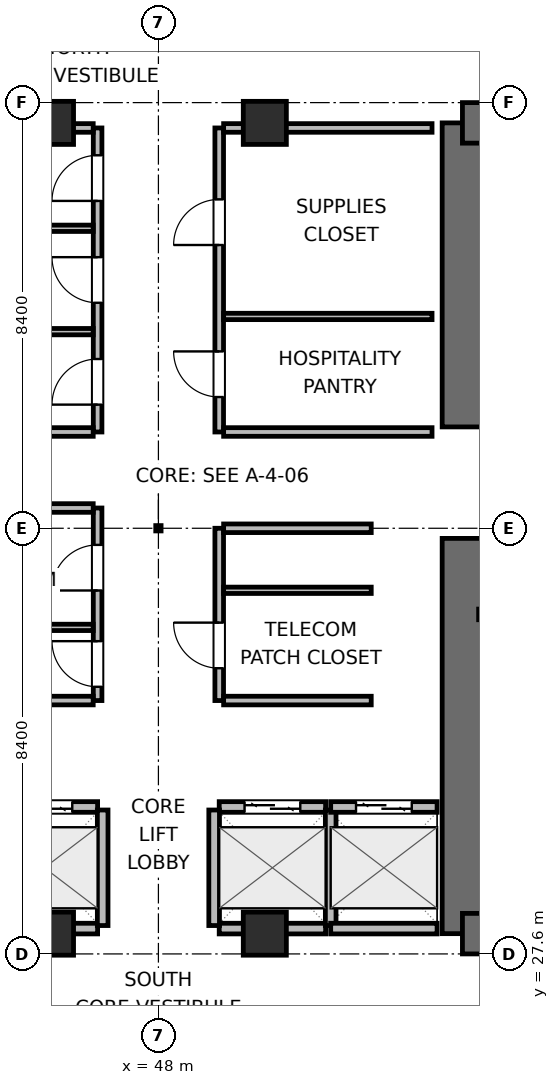
"""IFC4 building model, lengths in metres.
Left out: names, types, materials, properties, quantities, classifications, styles, units other than length and angle.
Written with IfcOpenShell. Run it as: python <this file> out.ifc"""

import sys

from ifc_helpers import new_model, si_unit, direction, frame, frame_2d, origin, origin_2d, place, context, subcontext, project, spatial, rectangle, extrude, element, fill, save


model = new_model("IFC4")
c1 = context("Model", 3, precision=1e-05, world=origin(), true_north=direction((0.0, 1.0)))
c2 = subcontext(c1, "Body", "Model", "MODEL_VIEW")
j1 = project(units=[si_unit("LENGTHUNIT", "METRE"), si_unit("PLANEANGLEUNIT", "RADIAN")], contexts=[c1])
p1 = place(None, origin())
s1 = spatial("IfcSite", under=j1, at=p1, CompositionType="ELEMENT")
p2 = place(p1, origin())
s2 = spatial("IfcBuilding", under=s1, at=p2, CompositionType="ELEMENT")
p3 = place(p2, frame((0.0, 0.0, 97.5)))
s3 = spatial("IfcBuildingStorey", under=s2, at=p3, CompositionType="ELEMENT", Elevation=97.5)
p4 = place(p3, frame((54.0, 28.0, 0.0), z_axis=(0.0, 0.0, 1.0), x_axis=(0.0, 1.0, 0.0)))
e1 = element("IfcWall", 1, at=p4, inside=s3, PredefinedType="SHEAR", context=c2, shape_type="SweptSolid", body=[
    extrude(rectangle(XDim=7.8, YDim=0.8, at=frame_2d((3.9, 0.0))), origin(), (0.0, 0.0, 1.0), 3.9),
])
p5 = place(p3, frame((54.0, 38.0, 0.0), z_axis=(0.0, 0.0, 1.0), x_axis=(0.0, 1.0, 0.0)))
e2 = element("IfcWall", 2, at=p5, inside=s3, PredefinedType="SHEAR", context=c2, shape_type="SweptSolid", body=[
    extrude(rectangle(XDim=6.0, YDim=0.8, at=frame_2d((3.0, 0.0))), origin(), (0.0, 0.0, 1.0), 3.9),
])
p6 = place(p3, frame((54.0, 28.0, 0.0), z_axis=(0.0, 0.0, 1.0), x_axis=(1.0, 0.0, 0.0)))
e3 = element("IfcWall", 3, at=p6, inside=s3, PredefinedType="SHEAR", context=c2, shape_type="SweptSolid", body=[
    extrude(rectangle(XDim=9.2, YDim=0.8, at=frame_2d((4.6, 0.0))), origin(), (0.0, 0.0, 1.0), 3.9),
])
p7 = place(p6, frame((3.925, 0.0, 0.0)))
e4 = element("IfcOpeningElement", 4, at=p7, cuts=e3, PredefinedType="OPENING", context=c2, shape_type="SweptSolid", body=[
    extrude(rectangle(XDim=1.05, YDim=2.04, at=frame_2d((0.525, 1.02))), frame((0.0, 0.41, 0.0), z_axis=(0.0, -1.0, 0.0), x_axis=(1.0, 0.0, 0.0)), (0.0, 0.0, 1.0), 0.82),
])
p8 = place(p3, frame((54.0, 44.0, 0.0), z_axis=(0.0, 0.0, 1.0), x_axis=(1.0, 0.0, 0.0)))
e5 = element("IfcWall", 5, at=p8, inside=s3, PredefinedType="SHEAR", context=c2, shape_type="SweptSolid", body=[
    extrude(rectangle(XDim=9.2, YDim=0.8, at=frame_2d((4.6, 0.0))), origin(), (0.0, 0.0, 1.0), 3.9),
])
for number, where, z_axis, x_axis in (
    (6, (45.9, 28.0, 0.0), (0.0, 0.0, 1.0), (1.0, 0.0, 0.0)),
    (7, (50.1, 28.0, 0.0), (0.0, 0.0, 1.0), (1.0, 0.0, 0.0)),
    (8, (45.9, 44.0, 0.0), (0.0, 0.0, 1.0), (1.0, 0.0, 0.0)),
    (9, (50.1, 44.0, 0.0), (0.0, 0.0, 1.0), (1.0, 0.0, 0.0)),
):
    element("IfcColumn", number, at=place(p3, frame(where, z_axis=z_axis, x_axis=x_axis)), inside=s3, PredefinedType="COLUMN", context=c2, shape_type="SweptSolid", body=[
        extrude(rectangle(XDim=0.85, YDim=0.85, at=origin_2d()), origin(), (0.0, 0.0, 1.0), 3.9),
    ])
p9 = place(p3, frame((44.7, 30.5, 0.0), z_axis=(0.0, 0.0, 1.0), x_axis=(1.0, 0.0, 0.0)))
e10 = element("IfcWall", 10, at=p9, inside=s3, PredefinedType="PARTITIONING", context=c2, shape_type="SweptSolid", body=[
    extrude(rectangle(XDim=2.1, YDim=0.21, at=frame_2d((1.05, 0.0))), origin(), (0.0, 0.0, 1.0), 3.64),
])
p10 = place(p9, frame((0.5, 0.0, 0.0)))
e11 = element("IfcOpeningElement", 11, at=p10, cuts=e10, PredefinedType="OPENING", context=c2, shape_type="SweptSolid", body=[
    extrude(rectangle(XDim=1.1, YDim=2.04, at=frame_2d((0.55, 1.02))), frame((0.0, 0.115, 0.0), z_axis=(0.0, -1.0, 0.0), x_axis=(1.0, 0.0, 0.0)), (0.0, 0.0, 1.0), 0.23),
])
p11 = place(p3, frame((44.7, 28.1, 0.0), z_axis=(0.0, 0.0, 1.0), x_axis=(1.0, 0.0, 0.0)))
e12 = element("IfcWall", 12, at=p11, inside=s3, PredefinedType="PARTITIONING", context=c2, shape_type="SweptSolid", body=[
    extrude(rectangle(XDim=2.1, YDim=0.21, at=frame_2d((1.05, 0.0))), origin(), (0.0, 0.0, 1.0), 2.525),
])
p12 = place(p3, frame((46.9, 28.16, 0.0), z_axis=(0.0, 0.0, 1.0), x_axis=(0.0, 1.0, 0.0)))
e13 = element("IfcWall", 13, at=p12, inside=s3, PredefinedType="PARTITIONING", context=c2, shape_type="SweptSolid", body=[
    extrude(rectangle(XDim=2.28, YDim=0.21, at=frame_2d((1.14, 0.0))), origin(), (0.0, 0.0, 1.0), 3.64),
])
p13 = place(p3, frame((49.2, 30.5, 0.0), z_axis=(0.0, 0.0, 1.0), x_axis=(1.0, 0.0, 0.0)))
e14 = element("IfcWall", 14, at=p13, inside=s3, PredefinedType="PARTITIONING", context=c2, shape_type="SweptSolid", body=[
    extrude(rectangle(XDim=2.1, YDim=0.21, at=frame_2d((1.05, 0.0))), origin(), (0.0, 0.0, 1.0), 3.64),
])
p14 = place(p13, frame((0.5, 0.0, 0.0)))
e15 = element("IfcOpeningElement", 15, at=p14, cuts=e14, PredefinedType="OPENING", context=c2, shape_type="SweptSolid", body=[
    extrude(rectangle(XDim=1.1, YDim=2.04, at=frame_2d((0.55, 1.02))), frame((0.0, 0.115, 0.0), z_axis=(0.0, -1.0, 0.0), x_axis=(1.0, 0.0, 0.0)), (0.0, 0.0, 1.0), 0.23),
])
p15 = place(p3, frame((49.2, 28.1, 0.0), z_axis=(0.0, 0.0, 1.0), x_axis=(1.0, 0.0, 0.0)))
e16 = element("IfcWall", 16, at=p15, inside=s3, PredefinedType="PARTITIONING", context=c2, shape_type="SweptSolid", body=[
    extrude(rectangle(XDim=2.1, YDim=0.21, at=frame_2d((1.05, 0.0))), origin(), (0.0, 0.0, 1.0), 2.525),
])
for number, where, z_axis, x_axis in (
    (17, (49.1, 28.16, 0.0), (0.0, 0.0, 1.0), (0.0, 1.0, 0.0)),
    (18, (51.4, 28.16, 0.0), (0.0, 0.0, 1.0), (0.0, 1.0, 0.0)),
):
    element("IfcWall", number, at=place(p3, frame(where, z_axis=z_axis, x_axis=x_axis)), inside=s3, PredefinedType="PARTITIONING", context=c2, shape_type="SweptSolid", body=[
        extrude(rectangle(XDim=2.28, YDim=0.21, at=frame_2d((1.14, 0.0))), origin(), (0.0, 0.0, 1.0), 3.64),
    ])
p16 = place(p3, frame((51.4, 30.5, 0.0), z_axis=(0.0, 0.0, 1.0), x_axis=(1.0, 0.0, 0.0)))
e19 = element("IfcWall", 19, at=p16, inside=s3, PredefinedType="PARTITIONING", context=c2, shape_type="SweptSolid", body=[
    extrude(rectangle(XDim=2.1, YDim=0.21, at=frame_2d((1.05, 0.0))), origin(), (0.0, 0.0, 1.0), 3.64),
])
p17 = place(p16, frame((0.5, 0.0, 0.0)))
e20 = element("IfcOpeningElement", 20, at=p17, cuts=e19, PredefinedType="OPENING", context=c2, shape_type="SweptSolid", body=[
    extrude(rectangle(XDim=1.1, YDim=2.04, at=frame_2d((0.55, 1.02))), frame((0.0, 0.115, 0.0), z_axis=(0.0, -1.0, 0.0), x_axis=(1.0, 0.0, 0.0)), (0.0, 0.0, 1.0), 0.23),
])
p18 = place(p3, frame((51.4, 28.1, 0.0), z_axis=(0.0, 0.0, 1.0), x_axis=(1.0, 0.0, 0.0)))
e21 = element("IfcWall", 21, at=p18, inside=s3, PredefinedType="PARTITIONING", context=c2, shape_type="SweptSolid", body=[
    extrude(rectangle(XDim=2.1, YDim=0.21, at=frame_2d((1.05, 0.0))), origin(), (0.0, 0.0, 1.0), 2.525),
])
p19 = place(p3, frame((46.8, 32.6, 0.0), z_axis=(0.0, 0.0, 1.0), x_axis=(0.0, 1.0, 0.0)))
e22 = element("IfcWall", 22, at=p19, inside=s3, PredefinedType="PARTITIONING", context=c2, shape_type="SweptSolid", body=[
    extrude(rectangle(XDim=3.8, YDim=0.17, at=frame_2d((1.9, 0.0))), origin(), (0.0, 0.0, 1.0), 3.64),
])
p20 = place(p19, frame((0.272, 0.0, 0.0)))
e23 = element("IfcOpeningElement", 23, at=p20, cuts=e22, PredefinedType="OPENING", context=c2, shape_type="SweptSolid", body=[
    extrude(rectangle(XDim=0.9, YDim=2.02, at=frame_2d((0.45, 1.01))), frame((0.0, 0.095, 0.0), z_axis=(0.0, -1.0, 0.0), x_axis=(1.0, 0.0, 0.0)), (0.0, 0.0, 1.0), 0.19),
])
p21 = place(p19, frame((2.172, 0.0, 0.0)))
e24 = element("IfcOpeningElement", 24, at=p21, cuts=e22, PredefinedType="OPENING", context=c2, shape_type="SweptSolid", body=[
    extrude(rectangle(XDim=0.9, YDim=2.02, at=frame_2d((0.45, 1.01))), frame((0.0, 0.095, 0.0), z_axis=(0.0, -1.0, 0.0), x_axis=(1.0, 0.0, 0.0)), (0.0, 0.0, 1.0), 0.19),
])
for number, where, z_axis, x_axis in (
    (25, (43.8, 32.6, 0.0), (0.0, 0.0, 1.0), (1.0, 0.0, 0.0)),
    (26, (43.8, 36.4, 0.0), (0.0, 0.0, 1.0), (1.0, 0.0, 0.0)),
):
    element("IfcWall", number, at=place(p3, frame(where, z_axis=z_axis, x_axis=x_axis)), inside=s3, PredefinedType="PARTITIONING", context=c2, shape_type="SweptSolid", body=[
        extrude(rectangle(XDim=2.913, YDim=0.17, at=frame_2d((1.457, 0.0))), origin(), (0.0, 0.0, 1.0), 3.64),
    ])
p22 = place(p3, frame((43.8, 34.044, 0.0), z_axis=(0.0, 0.0, 1.0), x_axis=(1.0, 0.0, 0.0)))
e27 = element("IfcWall", 27, at=p22, inside=s3, PredefinedType="PARTITIONING", context=c2, shape_type="SweptSolid", body=[
    extrude(rectangle(XDim=2.913, YDim=0.125, at=frame_2d((1.457, 0.0))), origin(), (0.0, 0.0, 1.0), 3.64),
])
p23 = place(p3, frame((49.2, 32.6, 0.0), z_axis=(0.0, 0.0, 1.0), x_axis=(0.0, 1.0, 0.0)))
e28 = element("IfcWall", 28, at=p23, inside=s3, PredefinedType="PARTITIONING", context=c2, shape_type="SweptSolid", body=[
    extrude(rectangle(XDim=3.4, YDim=0.17, at=frame_2d((1.7, 0.0))), origin(), (0.0, 0.0, 1.0), 3.64),
])
p24 = place(p23, frame((0.638, 0.0, 0.0)))
e29 = element("IfcOpeningElement", 29, at=p24, cuts=e28, PredefinedType="OPENING", context=c2, shape_type="SweptSolid", body=[
    extrude(rectangle(XDim=0.9, YDim=2.02, at=frame_2d((0.45, 1.01))), frame((0.0, 0.095, 0.0), z_axis=(0.0, -1.0, 0.0), x_axis=(1.0, 0.0, 0.0)), (0.0, 0.0, 1.0), 0.19),
])
for number, where, z_axis, x_axis in (
    (30, (49.287, 32.6, 0.0), (0.0, 0.0, 1.0), (1.0, 0.0, 0.0)),
    (31, (49.287, 36.0, 0.0), (0.0, 0.0, 1.0), (1.0, 0.0, 0.0)),
):
    element("IfcWall", number, at=place(p3, frame(where, z_axis=z_axis, x_axis=x_axis)), inside=s3, PredefinedType="PARTITIONING", context=c2, shape_type="SweptSolid", body=[
        extrude(rectangle(XDim=2.913, YDim=0.17, at=frame_2d((1.457, 0.0))), origin(), (0.0, 0.0, 1.0), 3.64),
    ])
p25 = place(p3, frame((49.287, 34.776, 0.0), z_axis=(0.0, 0.0, 1.0), x_axis=(1.0, 0.0, 0.0)))
e32 = element("IfcWall", 32, at=p25, inside=s3, PredefinedType="PARTITIONING", context=c2, shape_type="SweptSolid", body=[
    extrude(rectangle(XDim=2.913, YDim=0.125, at=frame_2d((1.457, 0.0))), origin(), (0.0, 0.0, 1.0), 3.64),
])
p26 = place(p3, frame((46.8, 37.9, 0.0), z_axis=(0.0, 0.0, 1.0), x_axis=(0.0, 1.0, 0.0)))
e33 = element("IfcWall", 33, at=p26, inside=s3, PredefinedType="PARTITIONING", context=c2, shape_type="SweptSolid", body=[
    extrude(rectangle(XDim=6.0, YDim=0.17, at=frame_2d((3.0, 0.0))), origin(), (0.0, 0.0, 1.0), 3.64),
])
p27 = place(p26, frame((0.54, 0.0, 0.0)))
e34 = element("IfcOpeningElement", 34, at=p27, cuts=e33, PredefinedType="OPENING", context=c2, shape_type="SweptSolid", body=[
    extrude(rectangle(XDim=0.9, YDim=2.02, at=frame_2d((0.45, 1.01))), frame((0.0, 0.095, 0.0), z_axis=(0.0, -1.0, 0.0), x_axis=(1.0, 0.0, 0.0)), (0.0, 0.0, 1.0), 0.19),
])
p28 = place(p26, frame((2.55, 0.0, 0.0)))
e35 = element("IfcOpeningElement", 35, at=p28, cuts=e33, PredefinedType="OPENING", context=c2, shape_type="SweptSolid", body=[
    extrude(rectangle(XDim=0.9, YDim=2.02, at=frame_2d((0.45, 1.01))), frame((0.0, 0.095, 0.0), z_axis=(0.0, -1.0, 0.0), x_axis=(1.0, 0.0, 0.0)), (0.0, 0.0, 1.0), 0.19),
])
p29 = place(p26, frame((4.56, 0.0, 0.0)))
e36 = element("IfcOpeningElement", 36, at=p29, cuts=e33, PredefinedType="OPENING", context=c2, shape_type="SweptSolid", body=[
    extrude(rectangle(XDim=0.9, YDim=2.02, at=frame_2d((0.45, 1.01))), frame((0.0, 0.095, 0.0), z_axis=(0.0, -1.0, 0.0), x_axis=(1.0, 0.0, 0.0)), (0.0, 0.0, 1.0), 0.19),
])
p30 = place(p3, frame((42.5, 37.9, 0.0), z_axis=(0.0, 0.0, 1.0), x_axis=(1.0, 0.0, 0.0)))
e37 = element("IfcWall", 37, at=p30, inside=s3, PredefinedType="PARTITIONING", context=c2, shape_type="SweptSolid", body=[
    extrude(rectangle(XDim=4.213, YDim=0.17, at=frame_2d((2.106, 0.0))), origin(), (0.0, 0.0, 1.0), 3.64),
])
p31 = place(p3, frame((42.5, 43.9, 0.0), z_axis=(0.0, 0.0, 1.0), x_axis=(1.0, 0.0, 0.0)))
e38 = element("IfcWall", 38, at=p31, inside=s3, PredefinedType="PARTITIONING", context=c2, shape_type="SweptSolid", body=[
    extrude(rectangle(XDim=4.213, YDim=0.17, at=frame_2d((2.106, 0.0))), origin(), (0.0, 0.0, 1.0), 2.525),
])
for number, where, z_axis, x_axis in (
    (39, (42.5, 39.88, 0.0), (0.0, 0.0, 1.0), (1.0, 0.0, 0.0)),
    (40, (42.5, 41.92, 0.0), (0.0, 0.0, 1.0), (1.0, 0.0, 0.0)),
):
    element("IfcWall", number, at=place(p3, frame(where, z_axis=z_axis, x_axis=x_axis)), inside=s3, PredefinedType="PARTITIONING", context=c2, shape_type="SweptSolid", body=[
        extrude(rectangle(XDim=4.213, YDim=0.125, at=frame_2d((2.106, 0.0))), origin(), (0.0, 0.0, 1.0), 3.64),
    ])
p32 = place(p3, frame((49.2, 37.9, 0.0), z_axis=(0.0, 0.0, 1.0), x_axis=(0.0, 1.0, 0.0)))
e41 = element("IfcWall", 41, at=p32, inside=s3, PredefinedType="PARTITIONING", context=c2, shape_type="SweptSolid", body=[
    extrude(rectangle(XDim=6.0, YDim=0.17, at=frame_2d((3.0, 0.0))), origin(), (0.0, 0.0, 1.0), 3.64),
])
p33 = place(p32, frame((0.69, 0.0, 0.0)))
e42 = element("IfcOpeningElement", 42, at=p33, cuts=e41, PredefinedType="OPENING", context=c2, shape_type="SweptSolid", body=[
    extrude(rectangle(XDim=0.9, YDim=2.02, at=frame_2d((0.45, 1.01))), frame((0.0, 0.095, 0.0), z_axis=(0.0, -1.0, 0.0), x_axis=(1.0, 0.0, 0.0)), (0.0, 0.0, 1.0), 0.19),
])
p34 = place(p32, frame((3.69, 0.0, 0.0)))
e43 = element("IfcOpeningElement", 43, at=p34, cuts=e41, PredefinedType="OPENING", context=c2, shape_type="SweptSolid", body=[
    extrude(rectangle(XDim=0.9, YDim=2.02, at=frame_2d((0.45, 1.01))), frame((0.0, 0.095, 0.0), z_axis=(0.0, -1.0, 0.0), x_axis=(1.0, 0.0, 0.0)), (0.0, 0.0, 1.0), 0.19),
])
p35 = place(p3, frame((49.287, 37.9, 0.0), z_axis=(0.0, 0.0, 1.0), x_axis=(1.0, 0.0, 0.0)))
e44 = element("IfcWall", 44, at=p35, inside=s3, PredefinedType="PARTITIONING", context=c2, shape_type="SweptSolid", body=[
    extrude(rectangle(XDim=4.113, YDim=0.17, at=frame_2d((2.056, 0.0))), origin(), (0.0, 0.0, 1.0), 3.64),
])
p36 = place(p3, frame((49.287, 43.9, 0.0), z_axis=(0.0, 0.0, 1.0), x_axis=(1.0, 0.0, 0.0)))
e45 = element("IfcWall", 45, at=p36, inside=s3, PredefinedType="PARTITIONING", context=c2, shape_type="SweptSolid", body=[
    extrude(rectangle(XDim=4.113, YDim=0.17, at=frame_2d((2.056, 0.0))), origin(), (0.0, 0.0, 1.0), 2.525),
])
p37 = place(p3, frame((49.287, 40.18, 0.0), z_axis=(0.0, 0.0, 1.0), x_axis=(1.0, 0.0, 0.0)))
e46 = element("IfcWall", 46, at=p37, inside=s3, PredefinedType="PARTITIONING", context=c2, shape_type="SweptSolid", body=[
    extrude(rectangle(XDim=4.113, YDim=0.125, at=frame_2d((2.056, 0.0))), origin(), (0.0, 0.0, 1.0), 3.64),
])
p38 = place(p10, origin())
e47 = element("IfcDoor", 47, at=p38, inside=s3, OperationType="DOUBLE_DOOR_SLIDING", PredefinedType="DOOR", context=c2, shape_type="SweptSolid", body=[
    extrude(rectangle(XDim=1.1, YDim=2.04, at=frame_2d((0.55, 1.02))), frame((0.0, 0.025, 0.0), z_axis=(0.0, -1.0, 0.0), x_axis=(1.0, 0.0, 0.0)), (0.0, 0.0, 1.0), 0.05),
])
fill(e11, e47)
p39 = place(p14, origin())
e48 = element("IfcDoor", 48, at=p39, inside=s3, OperationType="DOUBLE_DOOR_SLIDING", PredefinedType="DOOR", context=c2, shape_type="SweptSolid", body=[
    extrude(rectangle(XDim=1.1, YDim=2.04, at=frame_2d((0.55, 1.02))), frame((0.0, 0.025, 0.0), z_axis=(0.0, -1.0, 0.0), x_axis=(1.0, 0.0, 0.0)), (0.0, 0.0, 1.0), 0.05),
])
fill(e15, e48)
p40 = place(p17, origin())
e49 = element("IfcDoor", 49, at=p40, inside=s3, OperationType="DOUBLE_DOOR_SLIDING", PredefinedType="DOOR", context=c2, shape_type="SweptSolid", body=[
    extrude(rectangle(XDim=1.1, YDim=2.04, at=frame_2d((0.55, 1.02))), frame((0.0, 0.025, 0.0), z_axis=(0.0, -1.0, 0.0), x_axis=(1.0, 0.0, 0.0)), (0.0, 0.0, 1.0), 0.05),
])
fill(e20, e49)
p41 = place(p20, origin())
e50 = element("IfcDoor", 50, at=p41, inside=s3, OperationType="SINGLE_SWING_RIGHT", PredefinedType="DOOR", context=c2, shape_type="SweptSolid", body=[
    extrude(rectangle(XDim=0.9, YDim=2.02, at=frame_2d((0.45, 1.01))), frame((0.0, 0.025, 0.0), z_axis=(0.0, -1.0, 0.0), x_axis=(1.0, 0.0, 0.0)), (0.0, 0.0, 1.0), 0.05),
])
fill(e23, e50)
p42 = place(p21, origin())
e51 = element("IfcDoor", 51, at=p42, inside=s3, OperationType="SINGLE_SWING_LEFT", PredefinedType="DOOR", context=c2, shape_type="SweptSolid", body=[
    extrude(rectangle(XDim=0.9, YDim=2.02, at=frame_2d((0.45, 1.01))), frame((0.0, 0.025, 0.0), z_axis=(0.0, -1.0, 0.0), x_axis=(1.0, 0.0, 0.0)), (0.0, 0.0, 1.0), 0.05),
])
fill(e24, e51)
p43 = place(p24, origin())
e52 = element("IfcDoor", 52, at=p43, inside=s3, OperationType="SINGLE_SWING_RIGHT", PredefinedType="DOOR", context=c2, shape_type="SweptSolid", body=[
    extrude(rectangle(XDim=0.9, YDim=2.02, at=frame_2d((0.45, 1.01))), frame((0.0, 0.025, 0.0), z_axis=(0.0, -1.0, 0.0), x_axis=(1.0, 0.0, 0.0)), (0.0, 0.0, 1.0), 0.05),
])
fill(e29, e52)
p44 = place(p27, origin())
e53 = element("IfcDoor", 53, at=p44, inside=s3, OperationType="SINGLE_SWING_LEFT", PredefinedType="DOOR", context=c2, shape_type="SweptSolid", body=[
    extrude(rectangle(XDim=0.9, YDim=2.02, at=frame_2d((0.45, 1.01))), frame((0.0, 0.025, 0.0), z_axis=(0.0, -1.0, 0.0), x_axis=(1.0, 0.0, 0.0)), (0.0, 0.0, 1.0), 0.05),
])
fill(e34, e53)
p45 = place(p28, origin())
e54 = element("IfcDoor", 54, at=p45, inside=s3, OperationType="SINGLE_SWING_RIGHT", PredefinedType="DOOR", context=c2, shape_type="SweptSolid", body=[
    extrude(rectangle(XDim=0.9, YDim=2.02, at=frame_2d((0.45, 1.01))), frame((0.0, 0.025, 0.0), z_axis=(0.0, -1.0, 0.0), x_axis=(1.0, 0.0, 0.0)), (0.0, 0.0, 1.0), 0.05),
])
fill(e35, e54)
p46 = place(p29, origin())
e55 = element("IfcDoor", 55, at=p46, inside=s3, OperationType="SINGLE_SWING_LEFT", PredefinedType="DOOR", context=c2, shape_type="SweptSolid", body=[
    extrude(rectangle(XDim=0.9, YDim=2.02, at=frame_2d((0.45, 1.01))), frame((0.0, 0.025, 0.0), z_axis=(0.0, -1.0, 0.0), x_axis=(1.0, 0.0, 0.0)), (0.0, 0.0, 1.0), 0.05),
])
fill(e36, e55)
p47 = place(p33, origin())
e56 = element("IfcDoor", 56, at=p47, inside=s3, OperationType="SINGLE_SWING_RIGHT", PredefinedType="DOOR", context=c2, shape_type="SweptSolid", body=[
    extrude(rectangle(XDim=0.9, YDim=2.02, at=frame_2d((0.45, 1.01))), frame((0.0, 0.025, 0.0), z_axis=(0.0, -1.0, 0.0), x_axis=(1.0, 0.0, 0.0)), (0.0, 0.0, 1.0), 0.05),
])
fill(e42, e56)
p48 = place(p34, origin())
e57 = element("IfcDoor", 57, at=p48, inside=s3, OperationType="SINGLE_SWING_LEFT", PredefinedType="DOOR", context=c2, shape_type="SweptSolid", body=[
    extrude(rectangle(XDim=0.9, YDim=2.02, at=frame_2d((0.45, 1.01))), frame((0.0, 0.025, 0.0), z_axis=(0.0, -1.0, 0.0), x_axis=(1.0, 0.0, 0.0)), (0.0, 0.0, 1.0), 0.05),
])
fill(e43, e57)
save(model, sys.argv[1])
